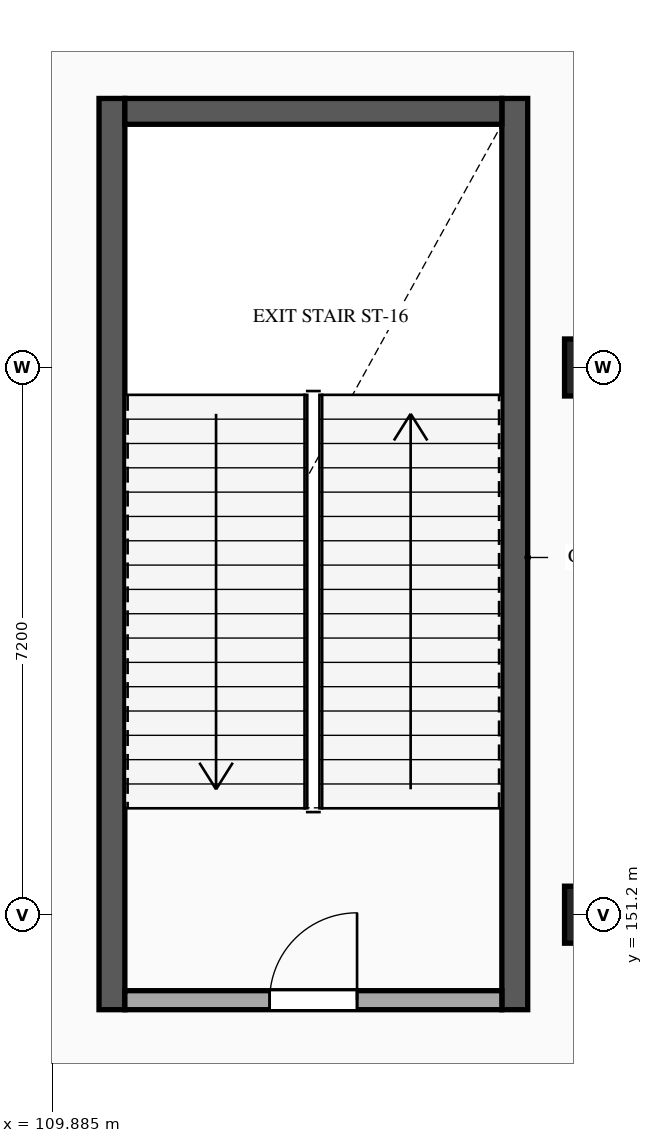
"""IFC4 building model, lengths in metres.
Left out: names, types, materials, properties, quantities, classifications, styles, units other than length and angle.
Written with IfcOpenShell. Run it as: python <this file> out.ifc"""

import sys

from ifc_helpers import new_model, si_unit, direction, frame, frame_2d, origin, origin_2d, place, context, subcontext, project, spatial, rectangle, extrude, element, fill, save


model = new_model("IFC4")
c1 = context("Model", 3, precision=1e-05, world=origin(), true_north=direction((0.0, 1.0)))
c2 = subcontext(c1, "Body", "Model", "MODEL_VIEW")
j1 = project(units=[si_unit("LENGTHUNIT", "METRE"), si_unit("PLANEANGLEUNIT", "RADIAN")], contexts=[c1])
p1 = place(None, origin())
s1 = spatial("IfcSite", under=j1, at=p1, CompositionType="ELEMENT")
p2 = place(p1, origin())
s2 = spatial("IfcBuilding", under=s1, at=p2, CompositionType="ELEMENT")
p3 = place(p2, frame((0.0, 0.0, 5.4)))
s3 = spatial("IfcBuildingStorey", under=s2, at=p3, CompositionType="ELEMENT", Elevation=5.4)
for number, where, z_axis, x_axis in (
    (1, (117.0, 151.2, 0.0), (0.0, 0.0, 1.0), (1.0, 0.0, 0.0)),
    (2, (117.0, 158.4, 0.0), (0.0, 0.0, 1.0), (1.0, 0.0, 0.0)),
):
    element("IfcColumn", number, at=place(p3, frame(where, z_axis=z_axis, x_axis=x_axis)), inside=s3, PredefinedType="COLUMN", context=c2, shape_type="SweptSolid", body=[
        extrude(rectangle(XDim=0.75, YDim=0.75, at=origin_2d()), origin(), (0.0, 0.0, 1.0), 5.4),
    ])
for number, where, z_axis, x_axis in (
    (3, (110.67, 149.95, 0.0), (0.0, 0.0, 1.0), (0.0, 1.0, 0.0)),
    (4, (115.97, 161.94, 0.0), (0.0, 0.0, 1.0), (0.0, -1.0, 0.0)),
):
    element("IfcWall", number, at=place(p3, frame(where, z_axis=z_axis, x_axis=x_axis)), inside=s3, PredefinedType="SHEAR", context=c2, shape_type="SweptSolid", body=[
        extrude(rectangle(XDim=11.99, YDim=0.34, at=frame_2d((5.995, 0.0))), origin(), (0.0, 0.0, 1.0), 5.12),
    ])
p4 = place(p3, frame((110.84, 161.77, 0.0), z_axis=(0.0, 0.0, 1.0), x_axis=(1.0, 0.0, 0.0)))
e5 = element("IfcWall", 5, at=p4, inside=s3, PredefinedType="SHEAR", context=c2, shape_type="SweptSolid", body=[
    extrude(rectangle(XDim=4.96, YDim=0.34, at=frame_2d((2.48, 0.0))), origin(), (0.0, 0.0, 1.0), 5.12),
])
p5 = place(p3, frame((110.84, 150.075, 0.0), z_axis=(0.0, 0.0, 1.0), x_axis=(1.0, 0.0, 0.0)))
e6 = element("IfcWall", 6, at=p5, inside=s3, PredefinedType="STANDARD", context=c2, shape_type="SweptSolid", body=[
    extrude(rectangle(XDim=4.96, YDim=0.25, at=frame_2d((2.48, 0.0))), origin(), (0.0, 0.0, 1.0), 5.12),
])
p6 = place(p5, frame((1.905, 0.0, 0.0)))
e7 = element("IfcOpeningElement", 7, at=p6, cuts=e6, PredefinedType="OPENING", context=c2, shape_type="SweptSolid", body=[
    extrude(rectangle(XDim=1.15, YDim=2.2, at=frame_2d((0.575, 1.1))), frame((0.0, 0.135, 0.0), z_axis=(0.0, -1.0, 0.0), x_axis=(1.0, 0.0, 0.0)), (0.0, 0.0, 1.0), 0.27),
])
p7 = place(p6, origin())
e8 = element("IfcDoor", 8, at=p7, inside=s3, OperationType="SINGLE_SWING_RIGHT", PredefinedType="DOOR", context=c2, shape_type="SweptSolid", body=[
    extrude(rectangle(XDim=1.15, YDim=2.2, at=frame_2d((0.575, 1.1))), frame((0.0, 0.025, 0.0), z_axis=(0.0, -1.0, 0.0), x_axis=(1.0, 0.0, 0.0)), (0.0, 0.0, 1.0), 0.05),
])
fill(e7, e8)
save(model, sys.argv[1])
